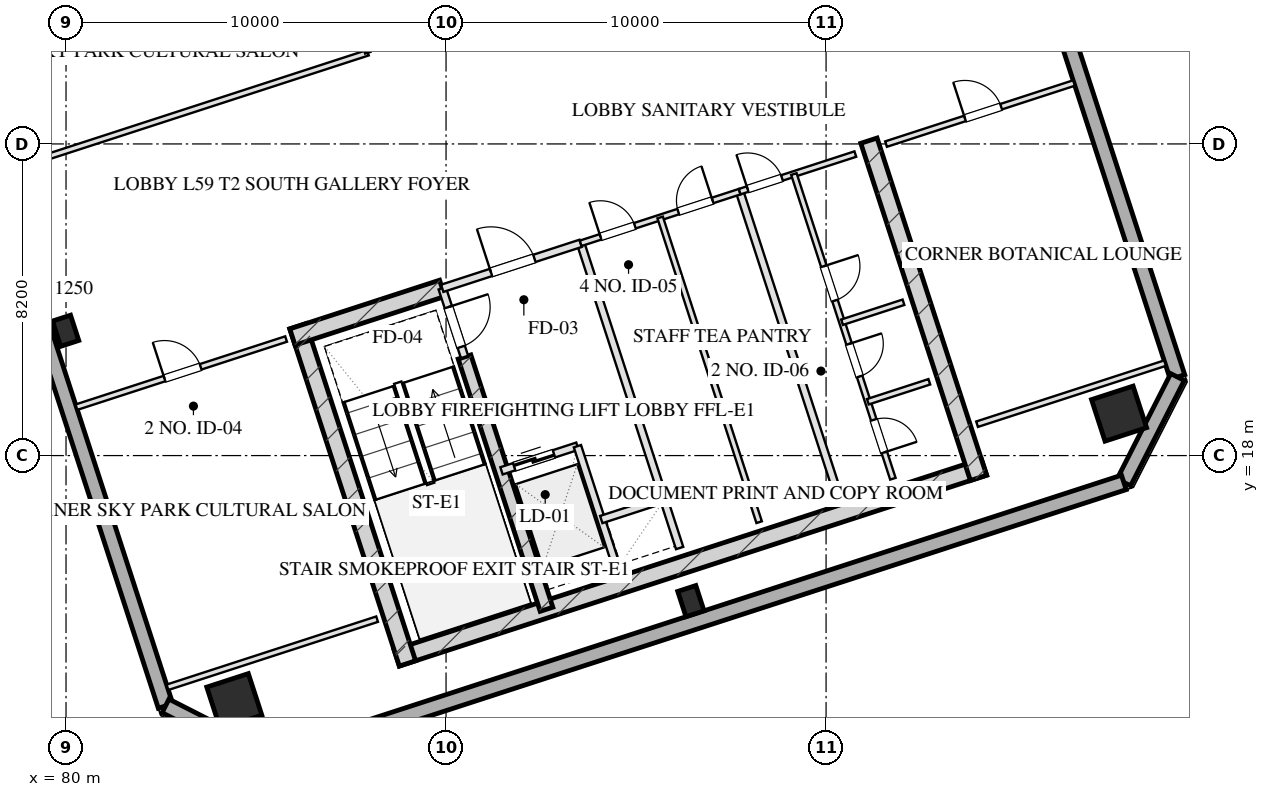
"""IFC4 building model, lengths in metres.
Left out: names, types, materials, properties, quantities, classifications, styles, units other than length and angle.
Written with IfcOpenShell. Run it as: python <this file> out.ifc"""

import sys

from ifc_helpers import new_model, si_unit, direction, frame, frame_2d, origin, origin_2d, place, context, subcontext, project, spatial, rectangle, hollow_rectangle, extrude, element, fill, save


model = new_model("IFC4")
c1 = context("Model", 3, precision=1e-05, world=origin(), true_north=direction((0.0, 1.0)))
c2 = subcontext(c1, "Body", "Model", "MODEL_VIEW")
j1 = project(units=[si_unit("LENGTHUNIT", "METRE"), si_unit("PLANEANGLEUNIT", "RADIAN")], contexts=[c1])
p1 = place(None, origin())
s1 = spatial("IfcSite", under=j1, at=p1, CompositionType="ELEMENT")
p2 = place(p1, origin())
s2 = spatial("IfcBuilding", under=s1, at=p2, CompositionType="ELEMENT")
p3 = place(p2, frame((0.0, 0.0, 219.65)))
s3 = spatial("IfcBuildingStorey", under=s2, at=p3, CompositionType="ELEMENT", Elevation=219.65)
p4 = place(p3, frame((88.701, 12.675, 0.0), z_axis=(0.0, 0.0, 1.0), x_axis=(0.95105824505, 0.309011673763, 0.0)))
e1 = element("IfcWall", 1, at=p4, inside=s3, PredefinedType="SHEAR", context=c2, shape_type="SweptSolid", body=[
    extrude(rectangle(XDim=16.25, YDim=0.45, at=frame_2d((8.125, 0.0))), origin(), (0.0, 0.0, 1.0), 3.45),
])
for number, where, z_axis, x_axis in (
    (2, (86.102, 21.404, 0.0), (0.0, 0.0, 1.0), (0.309, -0.951, 0.0)),
    (3, (101.128, 26.286, 0.0), (0.0, 0.0, 1.0), (0.309, -0.951, 0.0)),
):
    element("IfcWall", number, at=place(p3, frame(where, z_axis=z_axis, x_axis=x_axis)), inside=s3, PredefinedType="SHEAR", context=c2, shape_type="SweptSolid", body=[
        extrude(rectangle(XDim=9.33, YDim=0.45, at=frame_2d((4.665, 0.0))), origin(), (0.0, 0.0, 1.0), 3.45),
    ])
p5 = place(p3, frame((90.486, 20.594, 0.0), z_axis=(0.0, 0.0, 1.0), x_axis=(0.309020428229, -0.951055400562, 0.0)))
e4 = element("IfcWall", 4, at=p5, inside=s3, PredefinedType="SHEAR", context=c2, shape_type="SweptSolid", body=[
    extrude(rectangle(XDim=6.98, YDim=0.35, at=frame_2d((3.49, 0.0))), origin(), (0.0, 0.0, 1.0), 3.45),
])
p6 = place(p3, frame((85.957, 21.12, 0.0), z_axis=(0.0, 0.0, 1.0), x_axis=(0.951064796122, 0.308991510526, 0.0)))
e5 = element("IfcWall", 5, at=p6, inside=s3, PredefinedType="SHEAR", context=c2, shape_type="SweptSolid", body=[
    extrude(rectangle(XDim=4.145, YDim=0.45, at=frame_2d((2.073, 0.0))), origin(), (0.0, 0.0, 1.0), 3.45),
])
for number, where, z_axis, x_axis in (
    (6, (84.428, 11.539, 0.0), (0.0, 0.0, 1.0), (0.951, 0.309, 0.0)),
    (7, (107.71, 19.104, 0.0), (0.0, 0.0, 1.0), (0.951, 0.309, 0.0)),
):
    element("IfcColumn", number, at=place(p3, frame(where, z_axis=z_axis, x_axis=x_axis)), inside=s3, PredefinedType="COLUMN", context=c2, shape_type="SweptSolid", body=[
        extrude(hollow_rectangle(XDim=1.15, YDim=1.15, WallThickness=0.04, at=origin_2d()), origin(), (0.0, 0.0, 1.0), 3.451),
    ])
for number, where, z_axis, x_axis in (
    (8, (79.99, 21.284, 0.0), (0.0, 0.0, 1.0), (0.951, 0.309, 0.0)),
    (9, (96.443, 14.17, 0.0), (0.0, 0.0, 1.0), (0.951, 0.309, 0.0)),
):
    element("IfcColumn", number, at=place(p3, frame(where, z_axis=z_axis, x_axis=x_axis)), inside=s3, PredefinedType="COLUMN", context=c2, shape_type="SweptSolid", body=[
        extrude(hollow_rectangle(XDim=0.5, YDim=0.7, WallThickness=0.025, at=origin_2d()), origin(), (0.0, 0.0, 1.0), 3.451),
    ])
p7 = place(p3, frame((82.618, 11.414, 0.0), z_axis=(0.0, 0.0, 1.0), x_axis=(-0.309016491071, 0.951056679828, 0.0)))
e10 = element("IfcWall", 10, at=p7, inside=s3, PredefinedType="SOLIDWALL", context=c2, shape_type="SweptSolid", body=[
    extrude(rectangle(XDim=38.4, YDim=0.4, at=frame_2d((19.2, 0.0))), origin(), (0.0, 0.0, 1.0), 2.61),
])
p8 = place(p7, frame((20.4, 0.0, 0.0)))
e11 = element("IfcOpeningElement", 11, at=p8, cuts=e10, PredefinedType="OPENING", context=c2, shape_type="SweptSolid", body=[
    extrude(rectangle(XDim=1.8, YDim=2.2, at=frame_2d((0.9, 1.1))), frame((0.0, 0.21, 0.0), z_axis=(0.0, -1.0, 0.0), x_axis=(1.0, 0.0, 0.0)), (0.0, 0.0, 1.0), 0.42),
])
p9 = place(p3, frame((97.382, 56.586, 0.0), z_axis=(0.0, 0.0, 1.0), x_axis=(0.309016491071, -0.951056679828, 0.0)))
e12 = element("IfcWall", 12, at=p9, inside=s3, PredefinedType="SOLIDWALL", context=c2, shape_type="SweptSolid", body=[
    extrude(rectangle(XDim=38.4, YDim=0.4, at=frame_2d((19.2, 0.0))), origin(), (0.0, 0.0, 1.0), 2.61),
])
p10 = place(p9, frame((24.55, 0.0, 0.75)))
e13 = element("IfcOpeningElement", 13, at=p10, cuts=e12, PredefinedType="OPENING", context=c2, shape_type="SweptSolid", body=[
    extrude(rectangle(XDim=2.1, YDim=1.46, at=frame_2d((1.05, 0.73))), frame((0.0, 0.21, 0.0), z_axis=(0.0, -1.0, 0.0), x_axis=(1.0, 0.0, 0.0)), (0.0, 0.0, 1.0), 0.42),
])
p11 = place(p9, frame((20.75, 0.0, 0.75)))
e14 = element("IfcOpeningElement", 14, at=p11, cuts=e12, PredefinedType="OPENING", context=c2, shape_type="SweptSolid", body=[
    extrude(rectangle(XDim=2.1, YDim=1.46, at=frame_2d((1.05, 0.73))), frame((0.0, 0.21, 0.0), z_axis=(0.0, -1.0, 0.0), x_axis=(1.0, 0.0, 0.0)), (0.0, 0.0, 1.0), 0.42),
])
p12 = place(p9, frame((15.55, 0.0, 0.75)))
e15 = element("IfcOpeningElement", 15, at=p12, cuts=e12, PredefinedType="OPENING", context=c2, shape_type="SweptSolid", body=[
    extrude(rectangle(XDim=2.1, YDim=1.46, at=frame_2d((1.05, 0.73))), frame((0.0, 0.21, 0.0), z_axis=(0.0, -1.0, 0.0), x_axis=(1.0, 0.0, 0.0)), (0.0, 0.0, 1.0), 0.42),
])
p13 = place(p9, frame((11.75, 0.0, 0.75)))
e16 = element("IfcOpeningElement", 16, at=p13, cuts=e12, PredefinedType="OPENING", context=c2, shape_type="SweptSolid", body=[
    extrude(rectangle(XDim=2.1, YDim=1.46, at=frame_2d((1.05, 0.73))), frame((0.0, 0.21, 0.0), z_axis=(0.0, -1.0, 0.0), x_axis=(1.0, 0.0, 0.0)), (0.0, 0.0, 1.0), 0.42),
])
p14 = place(p3, frame((109.248, 20.066, 0.0), z_axis=(0.0, 0.0, 1.0), x_axis=(-0.453949291228, -0.891027519774, 0.0)))
e17 = element("IfcWall", 17, at=p14, inside=s3, PredefinedType="SOLIDWALL", context=c2, shape_type="SweptSolid", body=[
    extrude(rectangle(XDim=3.111, YDim=0.4, at=frame_2d((1.556, 0.0))), origin(), (0.0, 0.0, 1.0), 2.61),
])
p15 = place(p3, frame((107.835, 17.294, 0.0), z_axis=(0.0, 0.0, 1.0), x_axis=(-0.951058012937, -0.309012388148, 0.0)))
e18 = element("IfcWall", 18, at=p15, inside=s3, PredefinedType="SOLIDWALL", context=c2, shape_type="SweptSolid", body=[
    extrude(rectangle(XDim=23.6, YDim=0.4, at=frame_2d((11.8, 0.0))), origin(), (0.0, 0.0, 1.0), 2.61),
])
p16 = place(p3, frame((85.39, 10.001, 0.0), z_axis=(0.0, 0.0, 1.0), x_axis=(-0.890979603174, 0.454043331334, 0.0)))
e19 = element("IfcWall", 19, at=p16, inside=s3, PredefinedType="SOLIDWALL", context=c2, shape_type="SweptSolid", body=[
    extrude(rectangle(XDim=3.111, YDim=0.4, at=frame_2d((1.556, 0.0))), origin(), (0.0, 0.0, 1.0), 2.61),
])
p17 = place(p3, frame((89.899, 22.401, 0.0), z_axis=(0.0, 0.0, 1.0), x_axis=(0.308932062672, -0.951084108086, 0.0)))
e20 = element("IfcWall", 20, at=p17, inside=s3, PredefinedType="PARTITIONING", context=c2, shape_type="SweptSolid", body=[
    extrude(rectangle(XDim=1.9, YDim=0.2, at=frame_2d((0.95, 0.0))), origin(), (0.0, 0.0, 1.0), 3.175),
])
p18 = place(p17, frame((0.52, 0.0, 0.0)))
e21 = element("IfcOpeningElement", 21, at=p18, cuts=e20, PredefinedType="OPENING", context=c2, shape_type="SweptSolid", body=[
    extrude(rectangle(XDim=1.1, YDim=2.05, at=frame_2d((0.55, 1.025))), frame((0.0, 0.11, 0.0), z_axis=(0.0, -1.0, 0.0), x_axis=(1.0, 0.0, 0.0)), (0.0, 0.0, 1.0), 0.22),
])
p19 = place(p3, frame((93.542, 23.585, 0.0), z_axis=(0.0, 0.0, 1.0), x_axis=(0.309042196757, -0.951048327176, 0.0)))
e22 = element("IfcWall", 22, at=p19, inside=s3, PredefinedType="PARTITIONING", context=c2, shape_type="SweptSolid", body=[
    extrude(rectangle(XDim=8.43, YDim=0.2, at=frame_2d((4.215, 0.0))), origin(), (0.0, 0.0, 1.0), 3.175),
])
p20 = place(p3, frame((89.899, 22.401, 0.0), z_axis=(0.0, 0.0, 1.0), x_axis=(0.951046716504, 0.309047153403, 0.0)))
e23 = element("IfcWall", 23, at=p20, inside=s3, PredefinedType="PARTITIONING", context=c2, shape_type="SweptSolid", body=[
    extrude(rectangle(XDim=3.83, YDim=0.2, at=frame_2d((1.915, 0.0))), origin(), (0.0, 0.0, 1.0), 3.175),
])
p21 = place(p20, frame((1.35, 0.0, 0.0)))
e24 = element("IfcOpeningElement", 24, at=p21, cuts=e23, PredefinedType="OPENING", context=c2, shape_type="SweptSolid", body=[
    extrude(rectangle(XDim=1.2, YDim=2.05, at=frame_2d((0.6, 1.025))), frame((0.0, 0.11, 0.0), z_axis=(0.0, -1.0, 0.0), x_axis=(1.0, 0.0, 0.0)), (0.0, 0.0, 1.0), 0.22),
])
p22 = place(p3, frame((91.46, 17.598, 0.0), z_axis=(0.0, 0.0, 1.0), x_axis=(0.951062257173, 0.308999325213, 0.0)))
e25 = element("IfcWall", 25, at=p22, inside=s3, PredefinedType="PARTITIONING", context=c2, shape_type="SweptSolid", body=[
    extrude(rectangle(XDim=2.1, YDim=0.2, at=frame_2d((1.05, 0.0))), origin(), (0.0, 0.0, 1.0), 3.175),
])
p23 = place(p22, frame((0.35, 0.0, 0.0)))
e26 = element("IfcOpeningElement", 26, at=p23, cuts=e25, PredefinedType="OPENING", context=c2, shape_type="SweptSolid", body=[
    extrude(rectangle(XDim=1.1, YDim=2.05, at=frame_2d((0.55, 1.025))), frame((0.0, 0.11, 0.0), z_axis=(0.0, -1.0, 0.0), x_axis=(1.0, 0.0, 0.0)), (0.0, 0.0, 1.0), 0.22),
])
p24 = place(p3, frame((93.457, 18.247, 0.0), z_axis=(0.0, 0.0, 1.0), x_axis=(0.3089935693, -0.951064127245, 0.0)))
e27 = element("IfcWall", 27, at=p24, inside=s3, PredefinedType="PARTITIONING", context=c2, shape_type="SweptSolid", body=[
    extrude(rectangle(XDim=3.7, YDim=0.2, at=frame_2d((1.85, 0.0))), origin(), (0.0, 0.0, 1.0), 3.175),
])
p25 = place(p3, frame((94.084, 16.317, 0.0), z_axis=(0.0, 0.0, 1.0), x_axis=(0.951041328149, 0.309063734775, 0.0)))
e28 = element("IfcWall", 28, at=p25, inside=s3, PredefinedType="PARTITIONING", context=c2, shape_type="SweptSolid", body=[
    extrude(rectangle(XDim=1.73, YDim=0.2, at=frame_2d((0.865, 0.0))), origin(), (0.0, 0.0, 1.0), 3.175),
])
p26 = place(p3, frame((97.727, 24.944, 0.0), z_axis=(0.0, 0.0, 1.0), x_axis=(0.309016001439, -0.951056838919, 0.0)))
e29 = element("IfcWall", 29, at=p26, inside=s3, PredefinedType="PARTITIONING", context=c2, shape_type="SweptSolid", body=[
    extrude(rectangle(XDim=8.43, YDim=0.2, at=frame_2d((4.215, 0.0))), origin(), (0.0, 0.0, 1.0), 3.175),
])
p27 = place(p3, frame((93.542, 23.585, 0.0), z_axis=(0.0, 0.0, 1.0), x_axis=(0.951063829732, 0.308994485023, 0.0)))
e30 = element("IfcWall", 30, at=p27, inside=s3, PredefinedType="PARTITIONING", context=c2, shape_type="SweptSolid", body=[
    extrude(rectangle(XDim=4.4, YDim=0.15, at=frame_2d((2.2, 0.0))), origin(), (0.0, 0.0, 1.0), 3.175),
])
p28 = place(p27, frame((0.55, 0.0, 0.0)))
e31 = element("IfcOpeningElement", 31, at=p28, cuts=e30, PredefinedType="OPENING", context=c2, shape_type="SweptSolid", body=[
    extrude(rectangle(XDim=0.95, YDim=2.05, at=frame_2d((0.475, 1.025))), frame((0.0, 0.085, 0.0), z_axis=(0.0, -1.0, 0.0), x_axis=(1.0, 0.0, 0.0)), (0.0, 0.0, 1.0), 0.17),
])
p29 = place(p27, frame((2.7, 0.0, 0.0)))
e32 = element("IfcOpeningElement", 32, at=p29, cuts=e30, PredefinedType="OPENING", context=c2, shape_type="SweptSolid", body=[
    extrude(rectangle(XDim=0.95, YDim=2.05, at=frame_2d((0.475, 1.025))), frame((0.0, 0.085, 0.0), z_axis=(0.0, -1.0, 0.0), x_axis=(1.0, 0.0, 0.0)), (0.0, 0.0, 1.0), 0.17),
])
p30 = place(p3, frame((95.634, 24.265, 0.0), z_axis=(0.0, 0.0, 1.0), x_axis=(0.309007490203, -0.951059604335, 0.0)))
e33 = element("IfcWall", 33, at=p30, inside=s3, PredefinedType="PARTITIONING", context=c2, shape_type="SweptSolid", body=[
    extrude(rectangle(XDim=8.43, YDim=0.15, at=frame_2d((4.215, 0.0))), origin(), (0.0, 0.0, 1.0), 3.175),
])
p31 = place(p3, frame((97.727, 24.944, 0.0), z_axis=(0.0, 0.0, 1.0), x_axis=(0.951036872128, 0.309077446369, 0.0)))
e34 = element("IfcWall", 34, at=p31, inside=s3, PredefinedType="PARTITIONING", context=c2, shape_type="SweptSolid", body=[
    extrude(rectangle(XDim=3.2, YDim=0.15, at=frame_2d((1.6, 0.0))), origin(), (0.0, 0.0, 1.0), 3.175),
])
p32 = place(p31, frame((0.22, 0.0, 0.0)))
e35 = element("IfcOpeningElement", 35, at=p32, cuts=e34, PredefinedType="OPENING", context=c2, shape_type="SweptSolid", body=[
    extrude(rectangle(XDim=0.95, YDim=2.05, at=frame_2d((0.475, 1.025))), frame((0.0, 0.085, 0.0), z_axis=(0.0, -1.0, 0.0), x_axis=(1.0, 0.0, 0.0)), (0.0, 0.0, 1.0), 0.17),
])
p33 = place(p3, frame((99.153, 25.408, 0.0), z_axis=(0.0, 0.0, 1.0), x_axis=(0.309016001439, -0.951056838919, 0.0)))
e36 = element("IfcWall", 36, at=p33, inside=s3, PredefinedType="PARTITIONING", context=c2, shape_type="SweptSolid", body=[
    extrude(rectangle(XDim=8.43, YDim=0.15, at=frame_2d((4.215, 0.0))), origin(), (0.0, 0.0, 1.0), 3.175),
])
p34 = place(p33, frame((2.55, 0.0, 0.0)))
e37 = element("IfcOpeningElement", 37, at=p34, cuts=e36, PredefinedType="OPENING", context=c2, shape_type="SweptSolid", body=[
    extrude(rectangle(XDim=0.95, YDim=2.05, at=frame_2d((0.475, 1.025))), frame((0.0, 0.085, 0.0), z_axis=(0.0, -1.0, 0.0), x_axis=(1.0, 0.0, 0.0)), (0.0, 0.0, 1.0), 0.17),
])
p35 = place(p33, frame((4.7, 0.0, 0.0)))
e38 = element("IfcOpeningElement", 38, at=p35, cuts=e36, PredefinedType="OPENING", context=c2, shape_type="SweptSolid", body=[
    extrude(rectangle(XDim=0.9, YDim=2.05, at=frame_2d((0.45, 1.025))), frame((0.0, 0.085, 0.0), z_axis=(0.0, -1.0, 0.0), x_axis=(1.0, 0.0, 0.0)), (0.0, 0.0, 1.0), 0.17),
])
p36 = place(p33, frame((6.8, 0.0, 0.0)))
e39 = element("IfcOpeningElement", 39, at=p36, cuts=e36, PredefinedType="OPENING", context=c2, shape_type="SweptSolid", body=[
    extrude(rectangle(XDim=0.9, YDim=2.05, at=frame_2d((0.45, 1.025))), frame((0.0, 0.085, 0.0), z_axis=(0.0, -1.0, 0.0), x_axis=(1.0, 0.0, 0.0)), (0.0, 0.0, 1.0), 0.17),
])
p37 = place(p3, frame((100.42, 21.509, 0.0), z_axis=(0.0, 0.0, 1.0), x_axis=(0.951040401051, 0.309066587596, 0.0)))
e40 = element("IfcWall", 40, at=p37, inside=s3, PredefinedType="PARTITIONING", context=c2, shape_type="SweptSolid", body=[
    extrude(rectangle(XDim=1.7, YDim=0.15, at=frame_2d((0.85, 0.0))), origin(), (0.0, 0.0, 1.0), 3.175),
])
p38 = place(p3, frame((101.1, 19.416, 0.0), z_axis=(0.0, 0.0, 1.0), x_axis=(0.951054116971, 0.309024378638, 0.0)))
e41 = element("IfcWall", 41, at=p38, inside=s3, PredefinedType="PARTITIONING", context=c2, shape_type="SweptSolid", body=[
    extrude(rectangle(XDim=1.7, YDim=0.15, at=frame_2d((0.85, 0.0))), origin(), (0.0, 0.0, 1.0), 3.175),
])
p39 = place(p3, frame((82.669, 11.903, 0.0), z_axis=(0.0, 0.0, 1.0), x_axis=(0.951059431056, 0.309008023519, 0.0)))
e42 = element("IfcWall", 42, at=p39, inside=s3, PredefinedType="PARTITIONING", context=c2, shape_type="SweptSolid", body=[
    extrude(rectangle(XDim=5.8, YDim=0.15, at=frame_2d((2.9, 0.0))), origin(), (0.0, 0.0, 1.0), 3.175),
])
p40 = place(p3, frame((80.275, 19.274, 0.0), z_axis=(0.0, 0.0, 1.0), x_axis=(0.951059431056, 0.309008023519, 0.0)))
e43 = element("IfcWall", 43, at=p40, inside=s3, PredefinedType="PARTITIONING", context=c2, shape_type="SweptSolid", body=[
    extrude(rectangle(XDim=5.8, YDim=0.15, at=frame_2d((2.9, 0.0))), origin(), (0.0, 0.0, 1.0), 3.175),
])
p41 = place(p40, frame((2.436, 0.0, 0.0)))
e44 = element("IfcOpeningElement", 44, at=p41, cuts=e43, PredefinedType="OPENING", context=c2, shape_type="SweptSolid", body=[
    extrude(rectangle(XDim=1.0, YDim=2.05, at=frame_2d((0.5, 1.025))), frame((0.0, 0.085, 0.0), z_axis=(0.0, -1.0, 0.0), x_axis=(1.0, 0.0, 0.0)), (0.0, 0.0, 1.0), 0.17),
])
p42 = place(p3, frame((103.973, 18.825, 0.0), z_axis=(0.0, 0.0, 1.0), x_axis=(0.951055112834, 0.309021313752, 0.0)))
e45 = element("IfcWall", 45, at=p42, inside=s3, PredefinedType="PARTITIONING", context=c2, shape_type="SweptSolid", body=[
    extrude(rectangle(XDim=5.2, YDim=0.15, at=frame_2d((2.6, 0.0))), origin(), (0.0, 0.0, 1.0), 3.175),
])
p43 = place(p3, frame((101.578, 26.196, 0.0), z_axis=(0.0, 0.0, 1.0), x_axis=(0.951064427824, 0.308992644131, 0.0)))
e46 = element("IfcWall", 46, at=p43, inside=s3, PredefinedType="PARTITIONING", context=c2, shape_type="SweptSolid", body=[
    extrude(rectangle(XDim=5.2, YDim=0.15, at=frame_2d((2.6, 0.0))), origin(), (0.0, 0.0, 1.0), 3.175),
])
p44 = place(p43, frame((2.184, 0.0, 0.0)))
e47 = element("IfcOpeningElement", 47, at=p44, cuts=e46, PredefinedType="OPENING", context=c2, shape_type="SweptSolid", body=[
    extrude(rectangle(XDim=1.0, YDim=2.05, at=frame_2d((0.5, 1.025))), frame((0.0, 0.085, 0.0), z_axis=(0.0, -1.0, 0.0), x_axis=(1.0, 0.0, 0.0)), (0.0, 0.0, 1.0), 0.17),
])
p45 = place(p3, frame((78.266, 25.456, 0.0), z_axis=(0.0, 0.0, 1.0), x_axis=(0.951055402118, 0.30902042344, 0.0)))
e48 = element("IfcWall", 48, at=p45, inside=s3, PredefinedType="PARTITIONING", context=c2, shape_type="SweptSolid", body=[
    extrude(rectangle(XDim=10.175, YDim=0.15, at=frame_2d((5.087, 0.0))), origin(), (0.0, 0.0, 1.0), 3.175),
])
p46 = place(p3, frame((87.943, 28.6, 0.0), z_axis=(0.0, 0.0, 1.0), x_axis=(-0.309024734286, 0.951054001411, 0.0)))
e49 = element("IfcWall", 49, at=p46, inside=s3, PredefinedType="PARTITIONING", context=c2, shape_type="SweptSolid", body=[
    extrude(rectangle(XDim=9.0, YDim=0.15, at=frame_2d((4.5, 0.0))), origin(), (0.0, 0.0, 1.0), 3.175),
])
p47 = place(p46, frame((1.16, 0.0, 0.0)))
e50 = element("IfcOpeningElement", 50, at=p47, cuts=e49, PredefinedType="OPENING", context=c2, shape_type="SweptSolid", body=[
    extrude(rectangle(XDim=1.0, YDim=2.05, at=frame_2d((0.5, 1.025))), frame((0.0, 0.085, 0.0), z_axis=(0.0, -1.0, 0.0), x_axis=(1.0, 0.0, 0.0)), (0.0, 0.0, 1.0), 0.17),
])
p48 = place(p46, frame((5.56, 0.0, 0.0)))
e51 = element("IfcOpeningElement", 51, at=p48, cuts=e49, PredefinedType="OPENING", context=c2, shape_type="SweptSolid", body=[
    extrude(rectangle(XDim=1.2, YDim=2.05, at=frame_2d((0.6, 1.025))), frame((0.0, 0.085, 0.0), z_axis=(0.0, -1.0, 0.0), x_axis=(1.0, 0.0, 0.0)), (0.0, 0.0, 1.0), 0.17),
])
p49 = place(p3, frame((77.24, 28.613, 0.0), z_axis=(0.0, 0.0, 1.0), x_axis=(0.951055402118, 0.30902042344, 0.0)))
e52 = element("IfcWall", 52, at=p49, inside=s3, PredefinedType="MOVABLE", context=c2, shape_type="SweptSolid", body=[
    extrude(rectangle(XDim=10.175, YDim=0.1, at=frame_2d((5.087, 0.0))), origin(), (0.0, 0.0, 1.0), 3.175),
])
p50 = place(p18, origin())
e53 = element("IfcDoor", 53, at=p50, inside=s3, OperationType="SINGLE_SWING_LEFT", PredefinedType="DOOR", context=c2, shape_type="SweptSolid", body=[
    extrude(rectangle(XDim=1.1, YDim=2.05, at=frame_2d((0.55, 1.025))), frame((0.0, 0.025, 0.0), z_axis=(0.0, -1.0, 0.0), x_axis=(1.0, 0.0, 0.0)), (0.0, 0.0, 1.0), 0.05),
])
fill(e21, e53)
p51 = place(p21, origin())
e54 = element("IfcDoor", 54, at=p51, inside=s3, OperationType="SINGLE_SWING_LEFT", PredefinedType="DOOR", context=c2, shape_type="SweptSolid", body=[
    extrude(rectangle(XDim=1.2, YDim=2.05, at=frame_2d((0.6, 1.025))), frame((0.0, 0.025, 0.0), z_axis=(0.0, -1.0, 0.0), x_axis=(1.0, 0.0, 0.0)), (0.0, 0.0, 1.0), 0.05),
])
fill(e24, e54)
p52 = place(p23, origin())
e55 = element("IfcDoor", 55, at=p52, inside=s3, OperationType="DOUBLE_DOOR_SLIDING", PredefinedType="DOOR", context=c2, shape_type="SweptSolid", body=[
    extrude(rectangle(XDim=1.1, YDim=2.05, at=frame_2d((0.55, 1.025))), frame((0.0, 0.025, 0.0), z_axis=(0.0, -1.0, 0.0), x_axis=(1.0, 0.0, 0.0)), (0.0, 0.0, 1.0), 0.05),
])
fill(e26, e55)
p53 = place(p28, origin())
e56 = element("IfcDoor", 56, at=p53, inside=s3, OperationType="SINGLE_SWING_LEFT", PredefinedType="DOOR", context=c2, shape_type="SweptSolid", body=[
    extrude(rectangle(XDim=0.95, YDim=2.05, at=frame_2d((0.475, 1.025))), frame((0.0, 0.025, 0.0), z_axis=(0.0, -1.0, 0.0), x_axis=(1.0, 0.0, 0.0)), (0.0, 0.0, 1.0), 0.05),
])
fill(e31, e56)
p54 = place(p29, origin())
e57 = element("IfcDoor", 57, at=p54, inside=s3, OperationType="SINGLE_SWING_RIGHT", PredefinedType="DOOR", context=c2, shape_type="SweptSolid", body=[
    extrude(rectangle(XDim=0.95, YDim=2.05, at=frame_2d((0.475, 1.025))), frame((0.0, 0.025, 0.0), z_axis=(0.0, -1.0, 0.0), x_axis=(1.0, 0.0, 0.0)), (0.0, 0.0, 1.0), 0.05),
])
fill(e32, e57)
p55 = place(p32, origin())
e58 = element("IfcDoor", 58, at=p55, inside=s3, OperationType="SINGLE_SWING_LEFT", PredefinedType="DOOR", context=c2, shape_type="SweptSolid", body=[
    extrude(rectangle(XDim=0.95, YDim=2.05, at=frame_2d((0.475, 1.025))), frame((0.0, 0.025, 0.0), z_axis=(0.0, -1.0, 0.0), x_axis=(1.0, 0.0, 0.0)), (0.0, 0.0, 1.0), 0.05),
])
fill(e35, e58)
p56 = place(p34, origin())
e59 = element("IfcDoor", 59, at=p56, inside=s3, OperationType="SINGLE_SWING_LEFT", PredefinedType="DOOR", context=c2, shape_type="SweptSolid", body=[
    extrude(rectangle(XDim=0.95, YDim=2.05, at=frame_2d((0.475, 1.025))), frame((0.0, 0.025, 0.0), z_axis=(0.0, -1.0, 0.0), x_axis=(1.0, 0.0, 0.0)), (0.0, 0.0, 1.0), 0.05),
])
fill(e37, e59)
p57 = place(p35, origin())
e60 = element("IfcDoor", 60, at=p57, inside=s3, OperationType="SINGLE_SWING_LEFT", PredefinedType="DOOR", context=c2, shape_type="SweptSolid", body=[
    extrude(rectangle(XDim=0.9, YDim=2.05, at=frame_2d((0.45, 1.025))), frame((0.0, 0.025, 0.0), z_axis=(0.0, -1.0, 0.0), x_axis=(1.0, 0.0, 0.0)), (0.0, 0.0, 1.0), 0.05),
])
fill(e38, e60)
p58 = place(p36, origin())
e61 = element("IfcDoor", 61, at=p58, inside=s3, OperationType="SINGLE_SWING_RIGHT", PredefinedType="DOOR", context=c2, shape_type="SweptSolid", body=[
    extrude(rectangle(XDim=0.9, YDim=2.05, at=frame_2d((0.45, 1.025))), frame((0.0, 0.025, 0.0), z_axis=(0.0, -1.0, 0.0), x_axis=(1.0, 0.0, 0.0)), (0.0, 0.0, 1.0), 0.05),
])
fill(e39, e61)
p59 = place(p41, origin())
e62 = element("IfcDoor", 62, at=p59, inside=s3, OperationType="SINGLE_SWING_LEFT", PredefinedType="DOOR", context=c2, shape_type="SweptSolid", body=[
    extrude(rectangle(XDim=1.0, YDim=2.05, at=frame_2d((0.5, 1.025))), frame((0.0, 0.025, 0.0), z_axis=(0.0, -1.0, 0.0), x_axis=(1.0, 0.0, 0.0)), (0.0, 0.0, 1.0), 0.05),
])
fill(e44, e62)
p60 = place(p44, origin())
e63 = element("IfcDoor", 63, at=p60, inside=s3, OperationType="SINGLE_SWING_LEFT", PredefinedType="DOOR", context=c2, shape_type="SweptSolid", body=[
    extrude(rectangle(XDim=1.0, YDim=2.05, at=frame_2d((0.5, 1.025))), frame((0.0, 0.025, 0.0), z_axis=(0.0, -1.0, 0.0), x_axis=(1.0, 0.0, 0.0)), (0.0, 0.0, 1.0), 0.05),
])
fill(e47, e63)
save(model, sys.argv[1])
